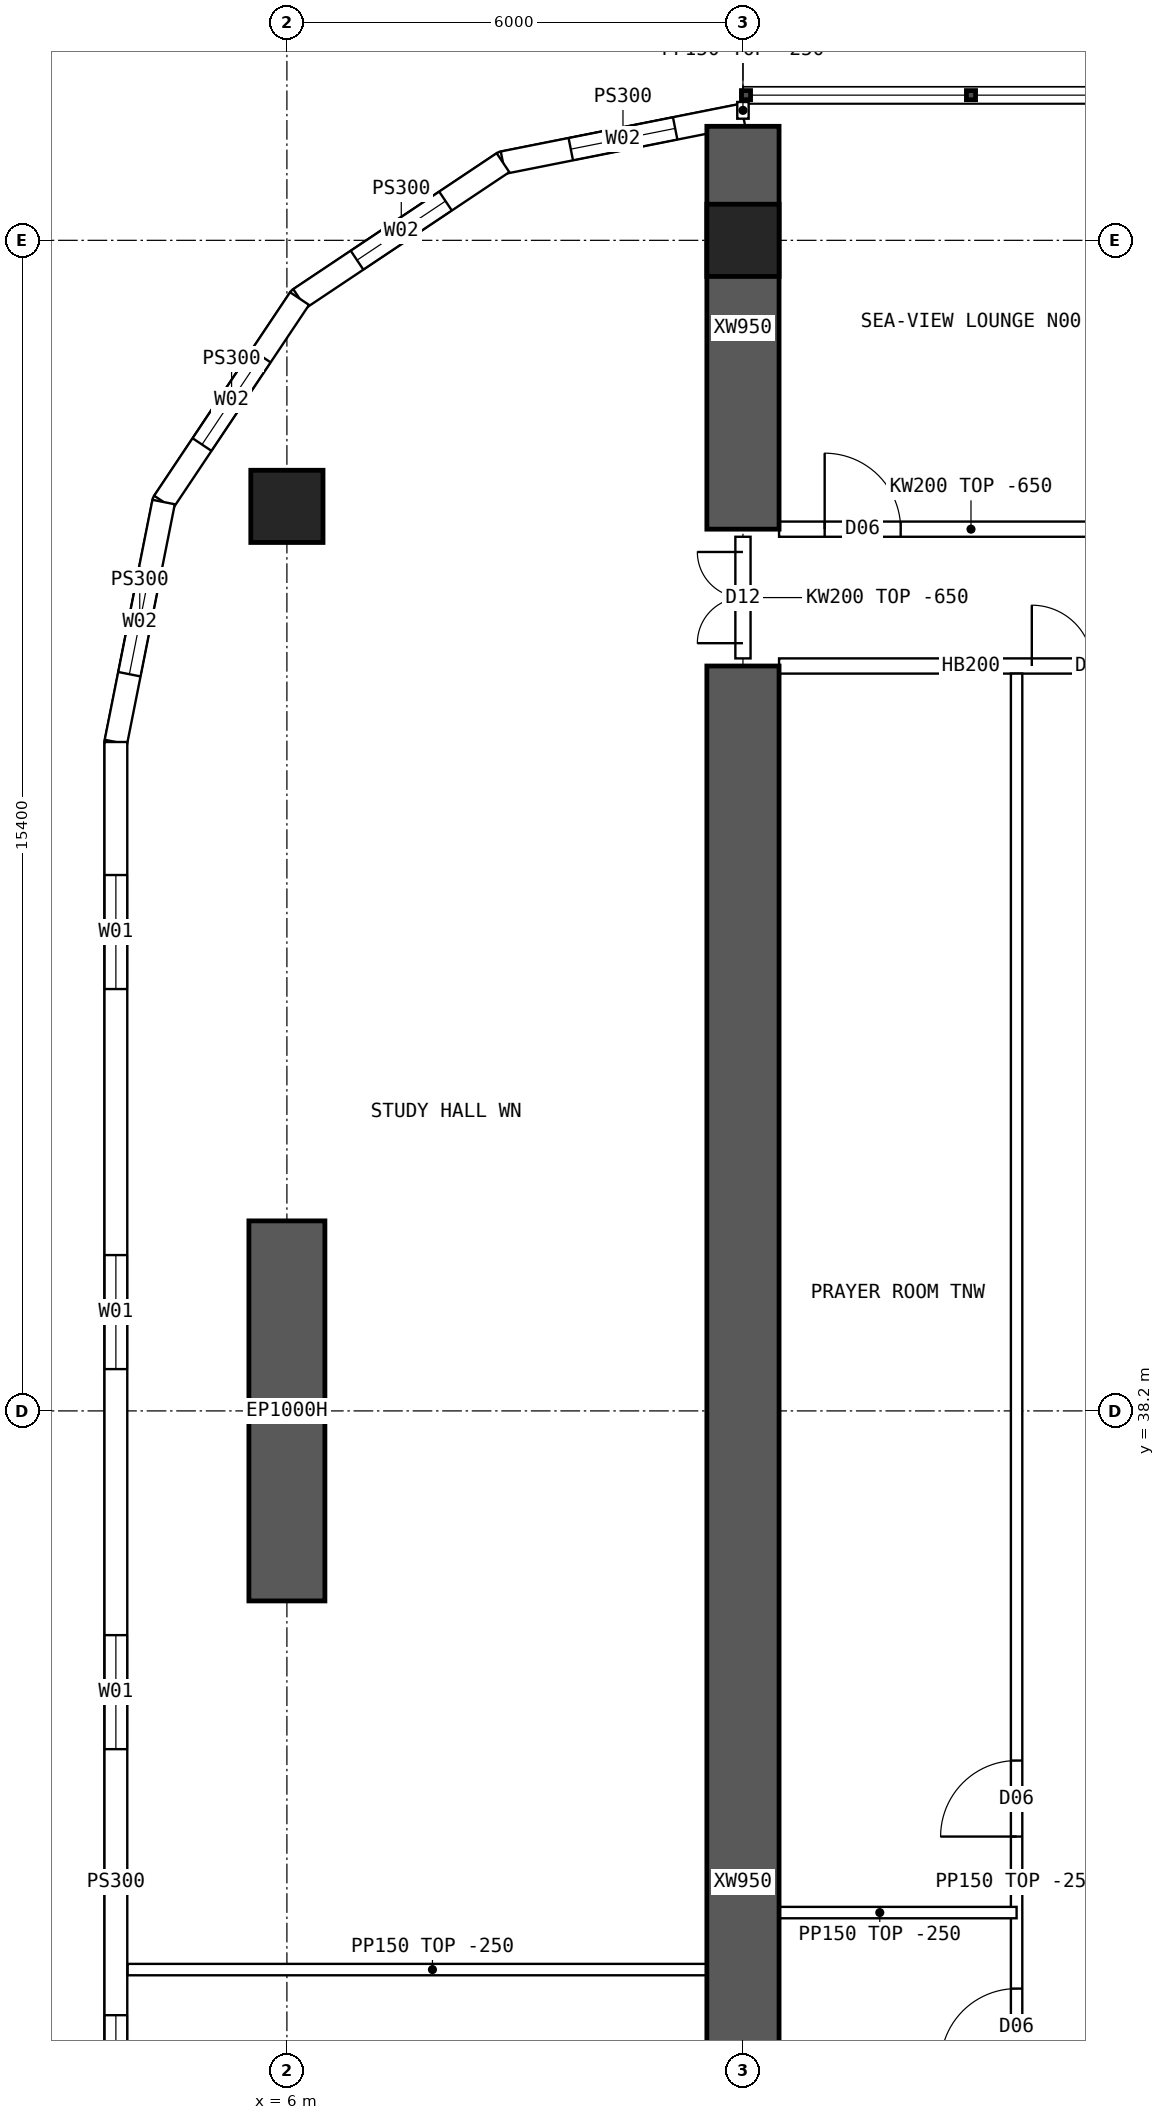
"""IFC4 building model, lengths in metres.
Left out: names, types, materials, properties, quantities, classifications, styles, units other than length and angle.
Written with IfcOpenShell. Run it as: python <this file> out.ifc"""

import sys

from ifc_helpers import new_model, si_unit, direction, frame, frame_2d, origin, origin_2d, place, context, subcontext, project, spatial, polyline, rectangle, hollow_rectangle, outline, extrude, element, fill, save


model = new_model("IFC4")
c1 = context("Model", 3, precision=1e-05, world=origin(), true_north=direction((0.0, 1.0)))
c2 = subcontext(c1, "Body", "Model", "MODEL_VIEW")
j1 = project(units=[si_unit("LENGTHUNIT", "METRE"), si_unit("PLANEANGLEUNIT", "RADIAN")], contexts=[c1])
p1 = place(None, origin())
s1 = spatial("IfcSite", under=j1, at=p1, CompositionType="ELEMENT")
p2 = place(p1, origin())
s2 = spatial("IfcBuilding", under=s1, at=p2, CompositionType="ELEMENT")
p3 = place(p2, frame((0.0, 0.0, 106.9)))
s3 = spatial("IfcBuildingStorey", under=s2, at=p3, CompositionType="ELEMENT", Elevation=106.9)
for number, where, z_axis, x_axis in (
    (1, (12.0, 53.6, 0.0), (0.0, 0.0, 1.0), (1.0, 0.0, 0.0)),
    (2, (6.0, 50.1, 0.0), (0.0, 0.0, 1.0), (1.0, 0.0, 0.0)),
):
    element("IfcColumn", number, at=place(p3, frame(where, z_axis=z_axis, x_axis=x_axis)), inside=s3, PredefinedType="COLUMN", context=c2, shape_type="SweptSolid", body=[
        extrude(hollow_rectangle(XDim=0.95, YDim=0.95, WallThickness=0.095, at=origin_2d()), origin(), (0.0, 0.0, 1.0), 3.75),
    ])
p4 = place(p3, frame((6.0, 35.7, 0.0), z_axis=(0.0, 0.0, 1.0), x_axis=(0.0, 1.0, 0.0)))
e3 = element("IfcWall", 3, at=p4, inside=s3, PredefinedType="SHEAR", context=c2, shape_type="SweptSolid", body=[
    extrude(rectangle(XDim=5.0, YDim=1.0, at=frame_2d((2.5, 0.0))), origin(), (0.0, 0.0, 1.0), 3.75),
])
p5 = place(p3, frame((12.0, 49.8, 0.0), z_axis=(0.0, 0.0, 1.0), x_axis=(0.0, 1.0, 0.0)))
e4 = element("IfcWall", 4, at=p5, inside=s3, PredefinedType="SHEAR", context=c2, shape_type="SweptSolid", body=[
    extrude(rectangle(XDim=5.3, YDim=0.95, at=frame_2d((2.65, 0.0))), origin(), (0.0, 0.0, 1.0), 3.75),
])
p6 = place(p3, frame((12.0, 16.0, 0.0), z_axis=(0.0, 0.0, 1.0), x_axis=(0.0, 1.0, 0.0)))
e5 = element("IfcWall", 5, at=p6, inside=s3, PredefinedType="SHEAR", context=c2, shape_type="SweptSolid", body=[
    extrude(rectangle(XDim=32.0, YDim=0.95, at=frame_2d((16.0, 0.0))), origin(), (0.0, 0.0, 1.0), 3.75),
])
p7 = place(p3, frame((3.75, 47.0, 0.0), z_axis=(0.0, 0.0, 1.0), x_axis=(0.0, -1.0, 0.0)))
e6 = element("IfcWall", 6, at=p7, inside=s3, PredefinedType="SOLIDWALL", context=c2, shape_type="SweptSolid", body=[
    extrude(outline(polyline([(-0.015, -0.15), (30.015, -0.15), (29.985, 0.15), (0.015, 0.15), (-0.015, -0.15)])), origin(), (0.0, 0.0, 1.0), 3.5),
])
p8 = place(p7, frame((1.75, 0.0, 0.9)))
e7 = element("IfcOpeningElement", 7, at=p8, cuts=e6, PredefinedType="OPENING", context=c2, shape_type="SweptSolid", body=[
    extrude(rectangle(XDim=1.5, YDim=2.0, at=frame_2d((0.75, 1.0))), frame((0.0, 0.16, 0.0), z_axis=(0.0, -1.0, 0.0), x_axis=(1.0, 0.0, 0.0)), (0.0, 0.0, 1.0), 0.32),
])
p9 = place(p7, frame((6.75, 0.0, 0.9)))
e8 = element("IfcOpeningElement", 8, at=p9, cuts=e6, PredefinedType="OPENING", context=c2, shape_type="SweptSolid", body=[
    extrude(rectangle(XDim=1.5, YDim=2.0, at=frame_2d((0.75, 1.0))), frame((0.0, 0.16, 0.0), z_axis=(0.0, -1.0, 0.0), x_axis=(1.0, 0.0, 0.0)), (0.0, 0.0, 1.0), 0.32),
])
p10 = place(p7, frame((11.75, 0.0, 0.9)))
e9 = element("IfcOpeningElement", 9, at=p10, cuts=e6, PredefinedType="OPENING", context=c2, shape_type="SweptSolid", body=[
    extrude(rectangle(XDim=1.5, YDim=2.0, at=frame_2d((0.75, 1.0))), frame((0.0, 0.16, 0.0), z_axis=(0.0, -1.0, 0.0), x_axis=(1.0, 0.0, 0.0)), (0.0, 0.0, 1.0), 0.32),
])
p11 = place(p7, frame((16.75, 0.0, 0.9)))
e10 = element("IfcOpeningElement", 10, at=p11, cuts=e6, PredefinedType="OPENING", context=c2, shape_type="SweptSolid", body=[
    extrude(rectangle(XDim=1.5, YDim=2.0, at=frame_2d((0.75, 1.0))), frame((0.0, 0.16, 0.0), z_axis=(0.0, -1.0, 0.0), x_axis=(1.0, 0.0, 0.0)), (0.0, 0.0, 1.0), 0.32),
])
p12 = place(p7, frame((21.75, 0.0, 0.9)))
e11 = element("IfcOpeningElement", 11, at=p12, cuts=e6, PredefinedType="OPENING", context=c2, shape_type="SweptSolid", body=[
    extrude(rectangle(XDim=1.5, YDim=2.0, at=frame_2d((0.75, 1.0))), frame((0.0, 0.16, 0.0), z_axis=(0.0, -1.0, 0.0), x_axis=(1.0, 0.0, 0.0)), (0.0, 0.0, 1.0), 0.32),
])
p13 = place(p7, frame((26.75, 0.0, 0.9)))
e12 = element("IfcOpeningElement", 12, at=p13, cuts=e6, PredefinedType="OPENING", context=c2, shape_type="SweptSolid", body=[
    extrude(rectangle(XDim=1.5, YDim=2.0, at=frame_2d((0.75, 1.0))), frame((0.0, 0.16, 0.0), z_axis=(0.0, -1.0, 0.0), x_axis=(1.0, 0.0, 0.0)), (0.0, 0.0, 1.0), 0.32),
])
p14 = place(p3, frame((12.0, 55.25, 0.0), z_axis=(0.0, 0.0, 1.0), x_axis=(-0.980787251524, -0.195080412259, 0.0)))
e13 = element("IfcWall", 13, at=p14, inside=s3, PredefinedType="SOLIDWALL", context=c2, shape_type="SweptSolid", body=[
    extrude(outline(polyline([(-0.03, -0.15), (3.249, -0.15), (3.189, 0.15), (0.03, 0.15), (-0.03, -0.15)])), origin(), (0.0, 0.0, 1.0), 3.5),
])
p15 = place(p14, frame((0.909, 0.0, 0.9)))
e14 = element("IfcOpeningElement", 14, at=p15, cuts=e13, PredefinedType="OPENING", context=c2, shape_type="SweptSolid", body=[
    extrude(rectangle(XDim=1.4, YDim=1.8, at=frame_2d((0.7, 0.9))), frame((0.0, 0.16, 0.0), z_axis=(0.0, -1.0, 0.0), x_axis=(1.0, 0.0, 0.0)), (0.0, 0.0, 1.0), 0.32),
])
p16 = place(p3, frame((8.843, 54.622, 0.0), z_axis=(0.0, 0.0, 1.0), x_axis=(-0.831443069936, -0.555609954424, 0.0)))
e15 = element("IfcWall", 15, at=p16, inside=s3, PredefinedType="SOLIDWALL", context=c2, shape_type="SweptSolid", body=[
    extrude(outline(polyline([(-0.03, -0.15), (3.249, -0.15), (3.189, 0.15), (0.03, 0.15), (-0.03, -0.15)])), origin(), (0.0, 0.0, 1.0), 3.5),
])
p17 = place(p16, frame((0.909, 0.0, 0.9)))
e16 = element("IfcOpeningElement", 16, at=p17, cuts=e15, PredefinedType="OPENING", context=c2, shape_type="SweptSolid", body=[
    extrude(rectangle(XDim=1.4, YDim=1.8, at=frame_2d((0.7, 0.9))), frame((0.0, 0.16, 0.0), z_axis=(0.0, -1.0, 0.0), x_axis=(1.0, 0.0, 0.0)), (0.0, 0.0, 1.0), 0.32),
])
p18 = place(p3, frame((6.167, 52.833, 0.0), z_axis=(0.0, 0.0, 1.0), x_axis=(-0.555609954424, -0.831443069936, 0.0)))
e17 = element("IfcWall", 17, at=p18, inside=s3, PredefinedType="SOLIDWALL", context=c2, shape_type="SweptSolid", body=[
    extrude(outline(polyline([(-0.03, -0.15), (3.249, -0.15), (3.189, 0.15), (0.03, 0.15), (-0.03, -0.15)])), origin(), (0.0, 0.0, 1.0), 3.5),
])
p19 = place(p18, frame((0.909, 0.0, 0.9)))
e18 = element("IfcOpeningElement", 18, at=p19, cuts=e17, PredefinedType="OPENING", context=c2, shape_type="SweptSolid", body=[
    extrude(rectangle(XDim=1.4, YDim=1.8, at=frame_2d((0.7, 0.9))), frame((0.0, 0.16, 0.0), z_axis=(0.0, -1.0, 0.0), x_axis=(1.0, 0.0, 0.0)), (0.0, 0.0, 1.0), 0.32),
])
p20 = place(p3, frame((4.378, 50.157, 0.0), z_axis=(0.0, 0.0, 1.0), x_axis=(-0.195080412259, -0.980787251524, 0.0)))
e19 = element("IfcWall", 19, at=p20, inside=s3, PredefinedType="SOLIDWALL", context=c2, shape_type="SweptSolid", body=[
    extrude(outline(polyline([(-0.03, -0.15), (3.234, -0.15), (3.204, 0.15), (0.03, 0.15), (-0.03, -0.15)])), origin(), (0.0, 0.0, 1.0), 3.5),
])
p21 = place(p20, frame((0.909, 0.0, 0.9)))
e20 = element("IfcOpeningElement", 20, at=p21, cuts=e19, PredefinedType="OPENING", context=c2, shape_type="SweptSolid", body=[
    extrude(rectangle(XDim=1.4, YDim=1.8, at=frame_2d((0.7, 0.9))), frame((0.0, 0.16, 0.0), z_axis=(0.0, -1.0, 0.0), x_axis=(1.0, 0.0, 0.0)), (0.0, 0.0, 1.0), 0.32),
])
p22 = place(p3, frame((12.475, 49.8, 0.0), z_axis=(0.0, 0.0, 1.0), x_axis=(1.0, 0.0, 0.0)))
e21 = element("IfcWall", 21, at=p22, inside=s3, PredefinedType="SOLIDWALL", context=c2, shape_type="SweptSolid", body=[
    extrude(outline(polyline([(0.0, 0.0), (5.05, 0.0), (5.05, 3.1), (0.0, 3.1), (0.0, 0.0)])), frame((0.0, 0.1, 0.0), z_axis=(0.0, -1.0, 0.0), x_axis=(1.0, 0.0, 0.0)), (0.0, 0.0, 1.0), 0.2),
])
p23 = place(p22, frame((0.6, 0.0, 0.0)))
e22 = element("IfcOpeningElement", 22, at=p23, cuts=e21, PredefinedType="OPENING", context=c2, shape_type="SweptSolid", body=[
    extrude(rectangle(XDim=1.0, YDim=2.1, at=frame_2d((0.5, 1.05))), frame((0.0, 0.11, 0.0), z_axis=(0.0, -1.0, 0.0), x_axis=(1.0, 0.0, 0.0)), (0.0, 0.0, 1.0), 0.22),
])
p24 = place(p3, frame((12.475, 48.0, 0.0), z_axis=(0.0, 0.0, 1.0), x_axis=(1.0, 0.0, 0.0)))
e23 = element("IfcWall", 23, at=p24, inside=s3, PredefinedType="SOLIDWALL", context=c2, shape_type="SweptSolid", body=[
    extrude(rectangle(XDim=5.05, YDim=0.2, at=frame_2d((2.525, 0.0))), origin(), (0.0, 0.0, 1.0), 3.5),
])
p25 = place(p24, frame((3.325, 0.0, 0.0)))
e24 = element("IfcOpeningElement", 24, at=p25, cuts=e23, PredefinedType="OPENING", context=c2, shape_type="SweptSolid", body=[
    extrude(rectangle(XDim=1.6, YDim=2.1, at=frame_2d((0.8, 1.05))), frame((0.0, 0.11, 0.0), z_axis=(0.0, -1.0, 0.0), x_axis=(1.0, 0.0, 0.0)), (0.0, 0.0, 1.0), 0.22),
])
p26 = place(p3, frame((15.6, 16.1, 0.0), z_axis=(0.0, 0.0, 1.0), x_axis=(0.0, 1.0, 0.0)))
e25 = element("IfcWall", 25, at=p26, inside=s3, PredefinedType="PARTITIONING", context=c2, shape_type="SweptSolid", body=[
    extrude(rectangle(XDim=31.8, YDim=0.15, at=frame_2d((15.9, 0.0))), origin(), (0.0, 0.0, 1.0), 3.5),
])
p27 = place(p26, frame((13.5, 0.0, 0.0)))
e26 = element("IfcOpeningElement", 26, at=p27, cuts=e25, PredefinedType="OPENING", context=c2, shape_type="SweptSolid", body=[
    extrude(rectangle(XDim=1.0, YDim=2.1, at=frame_2d((0.5, 1.05))), frame((0.0, 0.085, 0.0), z_axis=(0.0, -1.0, 0.0), x_axis=(1.0, 0.0, 0.0)), (0.0, 0.0, 1.0), 0.17),
])
p28 = place(p26, frame((16.5, 0.0, 0.0)))
e27 = element("IfcOpeningElement", 27, at=p28, cuts=e25, PredefinedType="OPENING", context=c2, shape_type="SweptSolid", body=[
    extrude(rectangle(XDim=1.0, YDim=2.1, at=frame_2d((0.5, 1.05))), frame((0.0, 0.085, 0.0), z_axis=(0.0, -1.0, 0.0), x_axis=(1.0, 0.0, 0.0)), (0.0, 0.0, 1.0), 0.17),
])
p29 = place(p3, frame((12.0, 31.6, 0.0), z_axis=(0.0, 0.0, 1.0), x_axis=(1.0, 0.0, 0.0)))
e28 = element("IfcWall", 28, at=p29, inside=s3, PredefinedType="PARTITIONING", context=c2, shape_type="SweptSolid", body=[
    extrude(rectangle(XDim=3.6, YDim=0.15, at=frame_2d((1.8, 0.0))), origin(), (0.0, 0.0, 1.0), 3.5),
])
p30 = place(p3, frame((3.905, 30.85, 0.0), z_axis=(0.0, 0.0, 1.0), x_axis=(1.0, 0.0, 0.0)))
e29 = element("IfcWall", 29, at=p30, inside=s3, PredefinedType="PARTITIONING", context=c2, shape_type="SweptSolid", body=[
    extrude(outline(polyline([(0.0, 0.0), (8.02, 0.0), (8.02, 3.5), (2.397, 3.5), (2.395, 3.05), (1.797, 3.05), (1.795, 3.5), (0.0, 3.5), (0.0, 0.0)])), frame((0.0, 0.075, 0.0), z_axis=(0.0, -1.0, 0.0), x_axis=(1.0, 0.0, 0.0)), (0.0, 0.0, 1.0), 0.15),
])
p31 = place(p3, frame((12.0, 48.1, 0.0), z_axis=(0.0, 0.0, 1.0), x_axis=(0.0, 1.0, 0.0)))
e30 = element("IfcWall", 30, at=p31, inside=s3, PredefinedType="SOLIDWALL", context=c2, shape_type="SweptSolid", body=[
    extrude(outline(polyline([(0.0, 0.0), (1.6, 0.0), (1.6, 3.1), (0.0, 3.1), (0.0, 0.0)])), frame((0.0, 0.1, 0.0), z_axis=(0.0, -1.0, 0.0), x_axis=(1.0, 0.0, 0.0)), (0.0, 0.0, 1.0), 0.2),
])
p32 = place(p31, frame((0.2, 0.0, 0.0)))
e31 = element("IfcOpeningElement", 31, at=p32, cuts=e30, PredefinedType="OPENING", context=c2, shape_type="SweptSolid", body=[
    extrude(rectangle(XDim=1.2, YDim=2.1, at=frame_2d((0.6, 1.05))), frame((0.0, 0.11, 0.0), z_axis=(0.0, -1.0, 0.0), x_axis=(1.0, 0.0, 0.0)), (0.0, 0.0, 1.0), 0.22),
])
p33 = place(p3, frame((12.0, 55.2, 0.0), z_axis=(0.0, 0.0, 1.0), x_axis=(0.0, 1.0, 0.0)))
e32 = element("IfcWall", 32, at=p33, inside=s3, PredefinedType="PARTITIONING", context=c2, shape_type="SweptSolid", body=[
    extrude(rectangle(XDim=0.22, YDim=0.15, at=frame_2d((0.11, 0.0))), origin(), (0.0, 0.0, 1.0), 3.5),
])
p34 = place(p8, origin())
e33 = element("IfcWindow", 33, at=p34, inside=s3, PartitioningType="SINGLE_PANEL", PredefinedType="WINDOW", context=c2, shape_type="SweptSolid", body=[
    extrude(rectangle(XDim=1.5, YDim=2.0, at=frame_2d((0.75, 1.0))), frame((0.0, 0.03, 0.0), z_axis=(0.0, -1.0, 0.0), x_axis=(1.0, 0.0, 0.0)), (0.0, 0.0, 1.0), 0.06),
])
fill(e7, e33)
p35 = place(p9, origin())
e34 = element("IfcWindow", 34, at=p35, inside=s3, PartitioningType="SINGLE_PANEL", PredefinedType="WINDOW", context=c2, shape_type="SweptSolid", body=[
    extrude(rectangle(XDim=1.5, YDim=2.0, at=frame_2d((0.75, 1.0))), frame((0.0, 0.03, 0.0), z_axis=(0.0, -1.0, 0.0), x_axis=(1.0, 0.0, 0.0)), (0.0, 0.0, 1.0), 0.06),
])
fill(e8, e34)
p36 = place(p10, origin())
e35 = element("IfcWindow", 35, at=p36, inside=s3, PartitioningType="SINGLE_PANEL", PredefinedType="WINDOW", context=c2, shape_type="SweptSolid", body=[
    extrude(rectangle(XDim=1.5, YDim=2.0, at=frame_2d((0.75, 1.0))), frame((0.0, 0.03, 0.0), z_axis=(0.0, -1.0, 0.0), x_axis=(1.0, 0.0, 0.0)), (0.0, 0.0, 1.0), 0.06),
])
fill(e9, e35)
p37 = place(p11, origin())
e36 = element("IfcWindow", 36, at=p37, inside=s3, PartitioningType="SINGLE_PANEL", PredefinedType="WINDOW", context=c2, shape_type="SweptSolid", body=[
    extrude(rectangle(XDim=1.5, YDim=2.0, at=frame_2d((0.75, 1.0))), frame((0.0, 0.03, 0.0), z_axis=(0.0, -1.0, 0.0), x_axis=(1.0, 0.0, 0.0)), (0.0, 0.0, 1.0), 0.06),
])
fill(e10, e36)
p38 = place(p15, origin())
e37 = element("IfcWindow", 37, at=p38, inside=s3, PartitioningType="SINGLE_PANEL", PredefinedType="WINDOW", context=c2, shape_type="SweptSolid", body=[
    extrude(rectangle(XDim=1.4, YDim=1.8, at=frame_2d((0.7, 0.9))), frame((0.0, 0.03, 0.0), z_axis=(0.0, -1.0, 0.0), x_axis=(1.0, 0.0, 0.0)), (0.0, 0.0, 1.0), 0.06),
])
fill(e14, e37)
p39 = place(p17, origin())
e38 = element("IfcWindow", 38, at=p39, inside=s3, PartitioningType="SINGLE_PANEL", PredefinedType="WINDOW", context=c2, shape_type="SweptSolid", body=[
    extrude(rectangle(XDim=1.4, YDim=1.8, at=frame_2d((0.7, 0.9))), frame((0.0, 0.03, 0.0), z_axis=(0.0, -1.0, 0.0), x_axis=(1.0, 0.0, 0.0)), (0.0, 0.0, 1.0), 0.06),
])
fill(e16, e38)
p40 = place(p19, origin())
e39 = element("IfcWindow", 39, at=p40, inside=s3, PartitioningType="SINGLE_PANEL", PredefinedType="WINDOW", context=c2, shape_type="SweptSolid", body=[
    extrude(rectangle(XDim=1.4, YDim=1.8, at=frame_2d((0.7, 0.9))), frame((0.0, 0.03, 0.0), z_axis=(0.0, -1.0, 0.0), x_axis=(1.0, 0.0, 0.0)), (0.0, 0.0, 1.0), 0.06),
])
fill(e18, e39)
p41 = place(p21, origin())
e40 = element("IfcWindow", 40, at=p41, inside=s3, PartitioningType="SINGLE_PANEL", PredefinedType="WINDOW", context=c2, shape_type="SweptSolid", body=[
    extrude(rectangle(XDim=1.4, YDim=1.8, at=frame_2d((0.7, 0.9))), frame((0.0, 0.03, 0.0), z_axis=(0.0, -1.0, 0.0), x_axis=(1.0, 0.0, 0.0)), (0.0, 0.0, 1.0), 0.06),
])
fill(e20, e40)
p42 = place(p25, origin())
e41 = element("IfcDoor", 41, at=p42, inside=s3, OperationType="DOUBLE_DOOR_SINGLE_SWING", PredefinedType="DOOR", context=c2, shape_type="SweptSolid", body=[
    extrude(rectangle(XDim=1.6, YDim=2.1, at=frame_2d((0.8, 1.05))), frame((0.0, 0.025, 0.0), z_axis=(0.0, -1.0, 0.0), x_axis=(1.0, 0.0, 0.0)), (0.0, 0.0, 1.0), 0.05),
])
fill(e24, e41)
p43 = place(p23, origin())
e42 = element("IfcDoor", 42, at=p43, inside=s3, OperationType="SINGLE_SWING_LEFT", PredefinedType="DOOR", context=c2, shape_type="SweptSolid", body=[
    extrude(rectangle(XDim=1.0, YDim=2.1, at=frame_2d((0.5, 1.05))), frame((0.0, 0.025, 0.0), z_axis=(0.0, -1.0, 0.0), x_axis=(1.0, 0.0, 0.0)), (0.0, 0.0, 1.0), 0.05),
])
fill(e22, e42)
p44 = place(p27, origin())
e43 = element("IfcDoor", 43, at=p44, inside=s3, OperationType="SINGLE_SWING_LEFT", PredefinedType="DOOR", context=c2, shape_type="SweptSolid", body=[
    extrude(rectangle(XDim=1.0, YDim=2.1, at=frame_2d((0.5, 1.05))), frame((0.0, 0.025, 0.0), z_axis=(0.0, -1.0, 0.0), x_axis=(1.0, 0.0, 0.0)), (0.0, 0.0, 1.0), 0.05),
])
fill(e26, e43)
p45 = place(p28, origin())
e44 = element("IfcDoor", 44, at=p45, inside=s3, OperationType="SINGLE_SWING_LEFT", PredefinedType="DOOR", context=c2, shape_type="SweptSolid", body=[
    extrude(rectangle(XDim=1.0, YDim=2.1, at=frame_2d((0.5, 1.05))), frame((0.0, 0.025, 0.0), z_axis=(0.0, -1.0, 0.0), x_axis=(1.0, 0.0, 0.0)), (0.0, 0.0, 1.0), 0.05),
])
fill(e27, e44)
p46 = place(p32, origin())
e45 = element("IfcDoor", 45, at=p46, inside=s3, OperationType="DOUBLE_DOOR_SINGLE_SWING", PredefinedType="DOOR", context=c2, shape_type="SweptSolid", body=[
    extrude(rectangle(XDim=1.2, YDim=2.1, at=frame_2d((0.6, 1.05))), frame((0.0, 0.025, 0.0), z_axis=(0.0, -1.0, 0.0), x_axis=(1.0, 0.0, 0.0)), (0.0, 0.0, 1.0), 0.05),
])
fill(e31, e45)
save(model, sys.argv[1])
